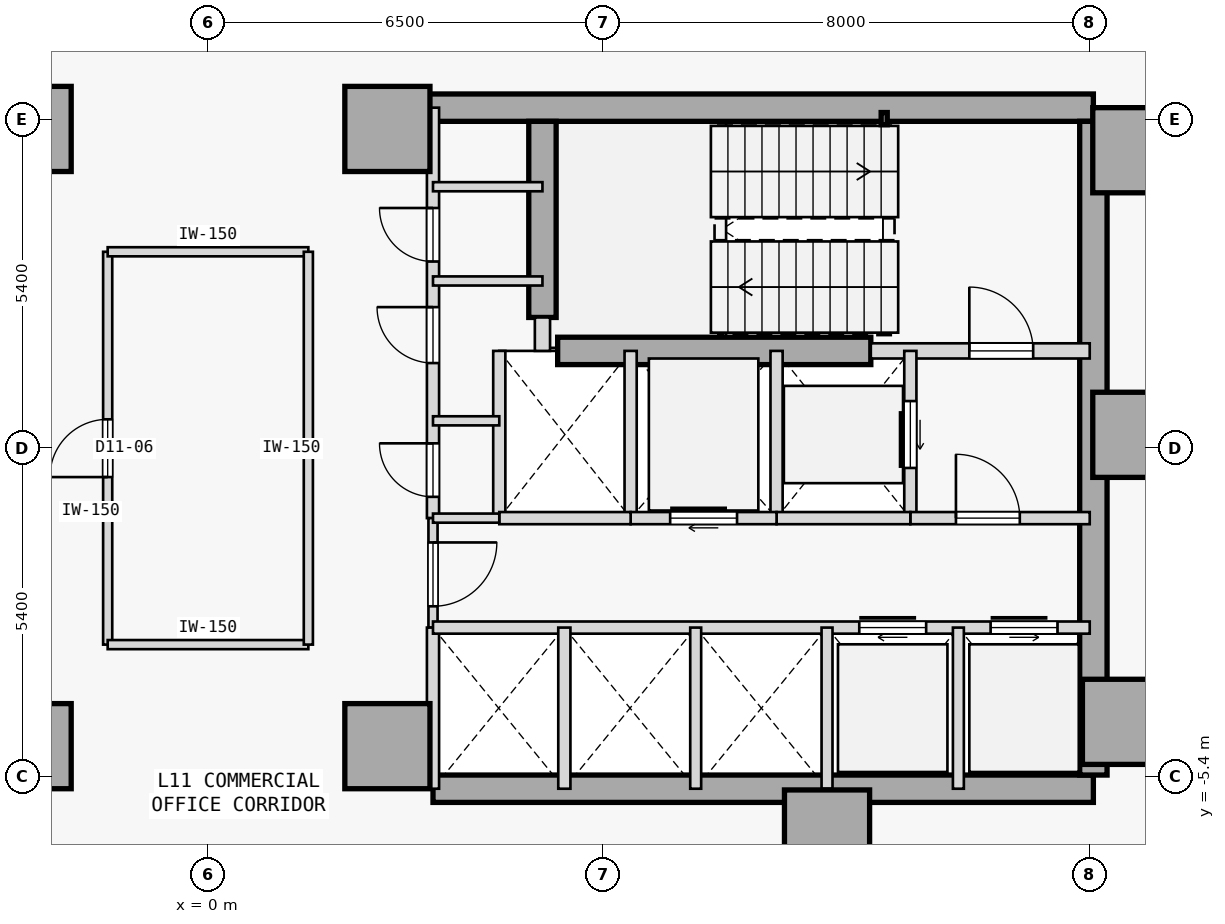
"""IFC4 building model, lengths in metres.
Left out: names, types, materials, properties, quantities, classifications, styles, units other than length and angle.
Written with IfcOpenShell. Run it as: python <this file> out.ifc"""

import sys

from ifc_helpers import new_model, si_unit, direction, frame, frame_2d, origin, origin_2d, place, context, subcontext, project, spatial, rectangle, hollow_rectangle, extrude, element, fill, save


model = new_model("IFC4")
c1 = context("Model", 3, precision=1e-05, world=origin(), true_north=direction((0.0, 1.0)))
c2 = subcontext(c1, "Body", "Model", "MODEL_VIEW")
j1 = project(units=[si_unit("LENGTHUNIT", "METRE"), si_unit("PLANEANGLEUNIT", "RADIAN")], contexts=[c1])
p1 = place(None, origin())
s1 = spatial("IfcSite", under=j1, at=p1, CompositionType="ELEMENT")
p2 = place(p1, origin())
s2 = spatial("IfcBuilding", under=s1, at=p2, CompositionType="ELEMENT")
p3 = place(p2, frame((0.0, 0.0, 48.4)))
s3 = spatial("IfcBuildingStorey", under=s2, at=p3, CompositionType="ELEMENT", Elevation=48.4)
for number, where, z_axis, x_axis in (
    (1, (-2.95, -4.9, 0.0), (0.0, 0.0, 1.0), (1.0, 0.0, 0.0)),
    (2, (-2.95, 5.25, 0.0), (0.0, 0.0, 1.0), (1.0, 0.0, 0.0)),
    (3, (15.25, 4.9, 0.0), (0.0, 0.0, 1.0), (1.0, 0.0, 0.0)),
    (4, (15.25, 0.22, 0.0), (0.0, 0.0, 1.0), (1.0, 0.0, 0.0)),
    (5, (15.08, -4.5, 0.0), (0.0, 0.0, 1.0), (1.0, 0.0, 0.0)),
    (6, (10.18, -6.32, 0.0), (0.0, 0.0, 1.0), (1.0, 0.0, 0.0)),
    (7, (2.95, -4.9, 0.0), (0.0, 0.0, 1.0), (1.0, 0.0, 0.0)),
    (8, (2.95, 5.25, 0.0), (0.0, 0.0, 1.0), (1.0, 0.0, 0.0)),
):
    element("IfcColumn", number, at=place(p3, frame(where, z_axis=z_axis, x_axis=x_axis)), inside=s3, PredefinedType="COLUMN", context=c2, shape_type="SweptSolid", body=[
        extrude(rectangle(XDim=1.4, YDim=1.4, at=origin_2d()), origin(), (0.0, 0.0, 1.0), 3.8),
    ])
p4 = place(p3, frame((3.15, 5.6, 0.0), z_axis=(0.0, 0.0, 1.0), x_axis=(1.0, 0.0, 0.0)))
e9 = element("IfcWall", 9, at=p4, inside=s3, PredefinedType="SHEAR", context=c2, shape_type="SweptSolid", body=[
    extrude(rectangle(XDim=11.41, YDim=0.45, at=frame_2d((5.705, 0.0))), origin(), (0.0, 0.0, 1.0), 3.575),
])
p5 = place(p3, frame((3.7, -5.6, 0.0), z_axis=(0.0, 0.0, 1.0), x_axis=(1.0, 0.0, 0.0)))
e10 = element("IfcWall", 10, at=p5, inside=s3, PredefinedType="SHEAR", context=c2, shape_type="SweptSolid", body=[
    extrude(rectangle(XDim=10.86, YDim=0.45, at=frame_2d((5.43, 0.0))), origin(), (0.0, 0.0, 1.0), 3.575),
])
p6 = place(p3, frame((14.56, -5.375, 0.0), z_axis=(0.0, 0.0, 1.0), x_axis=(0.0, 1.0, 0.0)))
e11 = element("IfcWall", 11, at=p6, inside=s3, PredefinedType="SHEAR", context=c2, shape_type="SweptSolid", body=[
    extrude(rectangle(XDim=10.75, YDim=0.45, at=frame_2d((5.375, 0.0))), origin(), (0.0, 0.0, 1.0), 3.575),
])
p7 = place(p3, frame((5.5, 2.15, 0.0), z_axis=(0.0, 0.0, 1.0), x_axis=(0.0, 1.0, 0.0)))
e12 = element("IfcWall", 12, at=p7, inside=s3, PredefinedType="SHEAR", context=c2, shape_type="SweptSolid", body=[
    extrude(rectangle(XDim=3.225, YDim=0.45, at=frame_2d((1.613, 0.0))), origin(), (0.0, 0.0, 1.0), 3.575),
])
p8 = place(p3, frame((5.75, 1.6, 0.0), z_axis=(0.0, 0.0, 1.0), x_axis=(1.0, 0.0, 0.0)))
e13 = element("IfcWall", 13, at=p8, inside=s3, PredefinedType="SHEAR", context=c2, shape_type="SweptSolid", body=[
    extrude(rectangle(XDim=5.15, YDim=0.45, at=frame_2d((2.575, 0.0))), origin(), (0.0, 0.0, 1.0), 3.575),
])
p9 = place(p3, frame((11.12, 5.42, 0.0), z_axis=(0.0, 0.0, 1.0), x_axis=(1.0, 0.0, 0.0)))
e14 = element("IfcColumn", 14, at=p9, inside=s3, PredefinedType="COLUMN", context=c2, shape_type="SweptSolid", body=[
    extrude(hollow_rectangle(XDim=0.1, YDim=0.2, WallThickness=0.008, at=origin_2d()), origin(), (0.0, 0.0, 1.0), 3.8),
])
p10 = place(p3, frame((10.9, 1.6, 0.0), z_axis=(0.0, 0.0, 1.0), x_axis=(1.0, 0.0, 0.0)))
e15 = element("IfcWall", 15, at=p10, inside=s3, PredefinedType="STANDARD", context=c2, shape_type="SweptSolid", body=[
    extrude(rectangle(XDim=3.6, YDim=0.25, at=frame_2d((1.8, 0.0))), origin(), (0.0, 0.0, 1.0), 3.575),
])
p11 = place(p10, frame((1.62, 0.0, 0.0)))
e16 = element("IfcOpeningElement", 16, at=p11, cuts=e15, PredefinedType="OPENING", context=c2, shape_type="SweptSolid", body=[
    extrude(rectangle(XDim=1.05, YDim=2.15, at=frame_2d((0.525, 1.075))), frame((0.0, 0.135, 0.0), z_axis=(0.0, -1.0, 0.0), x_axis=(1.0, 0.0, 0.0)), (0.0, 0.0, 1.0), 0.27),
])
p12 = place(p3, frame((5.5, 1.6, 0.0), z_axis=(0.0, 0.0, 1.0), x_axis=(0.0, 1.0, 0.0)))
e17 = element("IfcWall", 17, at=p12, inside=s3, PredefinedType="STANDARD", context=c2, shape_type="SweptSolid", body=[
    extrude(rectangle(XDim=0.55, YDim=0.25, at=frame_2d((0.275, 0.0))), origin(), (0.0, 0.0, 1.0), 3.575),
])
p13 = place(p3, frame((3.7, -1.15, 0.0), z_axis=(0.0, 0.0, 1.0), x_axis=(0.0, 1.0, 0.0)))
e18 = element("IfcWall", 18, at=p13, inside=s3, PredefinedType="STANDARD", context=c2, shape_type="SweptSolid", body=[
    extrude(rectangle(XDim=6.75, YDim=0.2, at=frame_2d((3.375, 0.0))), origin(), (0.0, 0.0, 1.0), 3.575),
])
p14 = place(p13, frame((0.35, 0.0, 0.0)))
e19 = element("IfcOpeningElement", 19, at=p14, cuts=e18, PredefinedType="OPENING", context=c2, shape_type="SweptSolid", body=[
    extrude(rectangle(XDim=0.88, YDim=2.15, at=frame_2d((0.44, 1.075))), frame((0.0, 0.11, 0.0), z_axis=(0.0, -1.0, 0.0), x_axis=(1.0, 0.0, 0.0)), (0.0, 0.0, 1.0), 0.22),
])
p15 = place(p13, frame((2.55, 0.0, 0.0)))
e20 = element("IfcOpeningElement", 20, at=p15, cuts=e18, PredefinedType="OPENING", context=c2, shape_type="SweptSolid", body=[
    extrude(rectangle(XDim=0.92, YDim=2.15, at=frame_2d((0.46, 1.075))), frame((0.0, 0.11, 0.0), z_axis=(0.0, -1.0, 0.0), x_axis=(1.0, 0.0, 0.0)), (0.0, 0.0, 1.0), 0.22),
])
p16 = place(p13, frame((4.22, 0.0, 0.0)))
e21 = element("IfcOpeningElement", 21, at=p16, cuts=e18, PredefinedType="OPENING", context=c2, shape_type="SweptSolid", body=[
    extrude(rectangle(XDim=0.88, YDim=2.15, at=frame_2d((0.44, 1.075))), frame((0.0, 0.11, 0.0), z_axis=(0.0, -1.0, 0.0), x_axis=(1.0, 0.0, 0.0)), (0.0, 0.0, 1.0), 0.22),
])
p17 = place(p3, frame((3.7, -2.95, 0.0), z_axis=(0.0, 0.0, 1.0), x_axis=(0.0, 1.0, 0.0)))
e22 = element("IfcWall", 22, at=p17, inside=s3, PredefinedType="PARTITIONING", context=c2, shape_type="SweptSolid", body=[
    extrude(rectangle(XDim=1.8, YDim=0.15, at=frame_2d((0.9, 0.0))), origin(), (0.0, 0.0, 1.0), 3.575),
])
p18 = place(p17, frame((0.35, 0.0, 0.0)))
e23 = element("IfcOpeningElement", 23, at=p18, cuts=e22, PredefinedType="OPENING", context=c2, shape_type="SweptSolid", body=[
    extrude(rectangle(XDim=1.05, YDim=2.18, at=frame_2d((0.525, 1.09))), frame((0.0, 0.085, 0.0), z_axis=(0.0, -1.0, 0.0), x_axis=(1.0, 0.0, 0.0)), (0.0, 0.0, 1.0), 0.17),
])
p19 = place(p3, frame((3.7, -5.6, 0.0), z_axis=(0.0, 0.0, 1.0), x_axis=(0.0, 1.0, 0.0)))
e24 = element("IfcWall", 24, at=p19, inside=s3, PredefinedType="STANDARD", context=c2, shape_type="SweptSolid", body=[
    extrude(rectangle(XDim=2.65, YDim=0.2, at=frame_2d((1.325, 0.0))), origin(), (0.0, 0.0, 1.0), 3.575),
])
p20 = place(p3, frame((11.55, -1.15, 0.0), z_axis=(0.0, 0.0, 1.0), x_axis=(0.0, 1.0, 0.0)))
e25 = element("IfcWall", 25, at=p20, inside=s3, PredefinedType="STANDARD", context=c2, shape_type="SweptSolid", body=[
    extrude(rectangle(XDim=2.75, YDim=0.2, at=frame_2d((1.375, 0.0))), origin(), (0.0, 0.0, 1.0), 3.575),
])
p21 = place(p20, frame((0.825, 0.0, 0.0)))
e26 = element("IfcOpeningElement", 26, at=p21, cuts=e25, PredefinedType="OPENING", context=c2, shape_type="SweptSolid", body=[
    extrude(rectangle(XDim=1.1, YDim=2.15, at=frame_2d((0.55, 1.075))), frame((0.0, 0.11, 0.0), z_axis=(0.0, -1.0, 0.0), x_axis=(1.0, 0.0, 0.0)), (0.0, 0.0, 1.0), 0.22),
])
p22 = place(p3, frame((9.35, -1.15, 0.0), z_axis=(0.0, 0.0, 1.0), x_axis=(0.0, 1.0, 0.0)))
e27 = element("IfcWall", 27, at=p22, inside=s3, PredefinedType="STANDARD", context=c2, shape_type="SweptSolid", body=[
    extrude(rectangle(XDim=2.75, YDim=0.2, at=frame_2d((1.375, 0.0))), origin(), (0.0, 0.0, 1.0), 3.575),
])
p23 = place(p3, frame((11.55, -1.15, 0.0), z_axis=(0.0, 0.0, 1.0), x_axis=(1.0, 0.0, 0.0)))
e28 = element("IfcWall", 28, at=p23, inside=s3, PredefinedType="STANDARD", context=c2, shape_type="SweptSolid", body=[
    extrude(rectangle(XDim=2.95, YDim=0.2, at=frame_2d((1.475, 0.0))), origin(), (0.0, 0.0, 1.0), 3.575),
])
p24 = place(p23, frame((0.75, 0.0, 0.0)))
e29 = element("IfcOpeningElement", 29, at=p24, cuts=e28, PredefinedType="OPENING", context=c2, shape_type="SweptSolid", body=[
    extrude(rectangle(XDim=1.05, YDim=2.18, at=frame_2d((0.525, 1.09))), frame((0.0, 0.11, 0.0), z_axis=(0.0, -1.0, 0.0), x_axis=(1.0, 0.0, 0.0)), (0.0, 0.0, 1.0), 0.22),
])
p25 = place(p3, frame((9.35, -1.15, 0.0), z_axis=(0.0, 0.0, 1.0), x_axis=(1.0, 0.0, 0.0)))
e30 = element("IfcWall", 30, at=p25, inside=s3, PredefinedType="STANDARD", context=c2, shape_type="SweptSolid", body=[
    extrude(rectangle(XDim=2.2, YDim=0.2, at=frame_2d((1.1, 0.0))), origin(), (0.0, 0.0, 1.0), 3.575),
])
p26 = place(p3, frame((6.95, -1.15, 0.0), z_axis=(0.0, 0.0, 1.0), x_axis=(0.0, 1.0, 0.0)))
e31 = element("IfcWall", 31, at=p26, inside=s3, PredefinedType="STANDARD", context=c2, shape_type="SweptSolid", body=[
    extrude(rectangle(XDim=2.75, YDim=0.2, at=frame_2d((1.375, 0.0))), origin(), (0.0, 0.0, 1.0), 3.575),
])
p27 = place(p3, frame((6.95, -1.15, 0.0), z_axis=(0.0, 0.0, 1.0), x_axis=(1.0, 0.0, 0.0)))
e32 = element("IfcWall", 32, at=p27, inside=s3, PredefinedType="STANDARD", context=c2, shape_type="SweptSolid", body=[
    extrude(rectangle(XDim=2.4, YDim=0.2, at=frame_2d((1.2, 0.0))), origin(), (0.0, 0.0, 1.0), 3.575),
])
p28 = place(p27, frame((0.65, 0.0, 0.0)))
e33 = element("IfcOpeningElement", 33, at=p28, cuts=e32, PredefinedType="OPENING", context=c2, shape_type="SweptSolid", body=[
    extrude(rectangle(XDim=1.1, YDim=2.15, at=frame_2d((0.55, 1.075))), frame((0.0, 0.11, 0.0), z_axis=(0.0, -1.0, 0.0), x_axis=(1.0, 0.0, 0.0)), (0.0, 0.0, 1.0), 0.22),
])
p29 = place(p3, frame((4.79, -1.15, 0.0), z_axis=(0.0, 0.0, 1.0), x_axis=(0.0, 1.0, 0.0)))
e34 = element("IfcWall", 34, at=p29, inside=s3, PredefinedType="STANDARD", context=c2, shape_type="SweptSolid", body=[
    extrude(rectangle(XDim=2.75, YDim=0.2, at=frame_2d((1.375, 0.0))), origin(), (0.0, 0.0, 1.0), 3.575),
])
p30 = place(p3, frame((4.79, -1.15, 0.0), z_axis=(0.0, 0.0, 1.0), x_axis=(1.0, 0.0, 0.0)))
e35 = element("IfcWall", 35, at=p30, inside=s3, PredefinedType="STANDARD", context=c2, shape_type="SweptSolid", body=[
    extrude(rectangle(XDim=2.16, YDim=0.2, at=frame_2d((1.08, 0.0))), origin(), (0.0, 0.0, 1.0), 3.575),
])
p31 = place(p3, frame((3.7, -1.15, 0.0), z_axis=(0.0, 0.0, 1.0), x_axis=(1.0, 0.0, 0.0)))
e36 = element("IfcWall", 36, at=p31, inside=s3, PredefinedType="PARTITIONING", context=c2, shape_type="SweptSolid", body=[
    extrude(rectangle(XDim=1.09, YDim=0.15, at=frame_2d((0.545, 0.0))), origin(), (0.0, 0.0, 1.0), 3.575),
])
p32 = place(p3, frame((3.7, -2.95, 0.0), z_axis=(0.0, 0.0, 1.0), x_axis=(1.0, 0.0, 0.0)))
e37 = element("IfcWall", 37, at=p32, inside=s3, PredefinedType="STANDARD", context=c2, shape_type="SweptSolid", body=[
    extrude(rectangle(XDim=10.8, YDim=0.2, at=frame_2d((5.4, 0.0))), origin(), (0.0, 0.0, 1.0), 3.575),
])
p33 = place(p32, frame((7.01, 0.0, 0.0)))
e38 = element("IfcOpeningElement", 38, at=p33, cuts=e37, PredefinedType="OPENING", context=c2, shape_type="SweptSolid", body=[
    extrude(rectangle(XDim=1.1, YDim=2.15, at=frame_2d((0.55, 1.075))), frame((0.0, 0.11, 0.0), z_axis=(0.0, -1.0, 0.0), x_axis=(1.0, 0.0, 0.0)), (0.0, 0.0, 1.0), 0.22),
])
p34 = place(p32, frame((9.17, 0.0, 0.0)))
e39 = element("IfcOpeningElement", 39, at=p34, cuts=e37, PredefinedType="OPENING", context=c2, shape_type="SweptSolid", body=[
    extrude(rectangle(XDim=1.1, YDim=2.15, at=frame_2d((0.55, 1.075))), frame((0.0, 0.11, 0.0), z_axis=(0.0, -1.0, 0.0), x_axis=(1.0, 0.0, 0.0)), (0.0, 0.0, 1.0), 0.22),
])
p35 = place(p3, frame((5.86, -5.6, 0.0), z_axis=(0.0, 0.0, 1.0), x_axis=(0.0, 1.0, 0.0)))
e40 = element("IfcWall", 40, at=p35, inside=s3, PredefinedType="STANDARD", context=c2, shape_type="SweptSolid", body=[
    extrude(rectangle(XDim=2.65, YDim=0.2, at=frame_2d((1.325, 0.0))), origin(), (0.0, 0.0, 1.0), 3.575),
])
for number, where, z_axis, x_axis in (
    (41, (12.34, -5.6, 0.0), (0.0, 0.0, 1.0), (0.0, 1.0, 0.0)),
    (42, (10.18, -5.6, 0.0), (0.0, 0.0, 1.0), (0.0, 1.0, 0.0)),
    (43, (8.02, -5.6, 0.0), (0.0, 0.0, 1.0), (0.0, 1.0, 0.0)),
):
    element("IfcWall", number, at=place(p3, frame(where, z_axis=z_axis, x_axis=x_axis)), inside=s3, PredefinedType="STANDARD", context=c2, shape_type="SweptSolid", body=[
        extrude(rectangle(XDim=2.65, YDim=0.18, at=frame_2d((1.325, 0.0))), origin(), (0.0, 0.0, 1.0), 3.575),
    ])
p36 = place(p3, frame((3.7, 4.3, 0.0), z_axis=(0.0, 0.0, 1.0), x_axis=(1.0, 0.0, 0.0)))
e44 = element("IfcWall", 44, at=p36, inside=s3, PredefinedType="PARTITIONING", context=c2, shape_type="SweptSolid", body=[
    extrude(rectangle(XDim=1.8, YDim=0.15, at=frame_2d((0.9, 0.0))), origin(), (0.0, 0.0, 1.0), 3.575),
])
p37 = place(p3, frame((3.7, 0.45, 0.0), z_axis=(0.0, 0.0, 1.0), x_axis=(1.0, 0.0, 0.0)))
e45 = element("IfcWall", 45, at=p37, inside=s3, PredefinedType="PARTITIONING", context=c2, shape_type="SweptSolid", body=[
    extrude(rectangle(XDim=1.09, YDim=0.15, at=frame_2d((0.545, 0.0))), origin(), (0.0, 0.0, 1.0), 3.575),
])
p38 = place(p3, frame((3.7, 2.75, 0.0), z_axis=(0.0, 0.0, 1.0), x_axis=(1.0, 0.0, 0.0)))
e46 = element("IfcWall", 46, at=p38, inside=s3, PredefinedType="PARTITIONING", context=c2, shape_type="SweptSolid", body=[
    extrude(rectangle(XDim=1.8, YDim=0.15, at=frame_2d((0.9, 0.0))), origin(), (0.0, 0.0, 1.0), 3.575),
])
p39 = place(p3, frame((-1.65, -3.23, 0.0), z_axis=(0.0, 0.0, 1.0), x_axis=(0.0, 1.0, 0.0)))
e47 = element("IfcWall", 47, at=p39, inside=s3, PredefinedType="PARTITIONING", context=c2, shape_type="SweptSolid", body=[
    extrude(rectangle(XDim=6.46, YDim=0.15, at=frame_2d((3.23, 0.0))), origin(), (0.0, 0.0, 1.0), 3.575),
])
p40 = place(p39, frame((2.755, 0.0, 0.0)))
e48 = element("IfcOpeningElement", 48, at=p40, cuts=e47, PredefinedType="OPENING", context=c2, shape_type="SweptSolid", body=[
    extrude(rectangle(XDim=0.95, YDim=2.15, at=frame_2d((0.475, 1.075))), frame((0.0, 0.085, 0.0), z_axis=(0.0, -1.0, 0.0), x_axis=(1.0, 0.0, 0.0)), (0.0, 0.0, 1.0), 0.17),
])
for number, where, z_axis, x_axis in (
    (49, (-1.65, -3.23, 0.0), (0.0, 0.0, 1.0), (1.0, 0.0, 0.0)),
    (50, (-1.65, 3.23, 0.0), (0.0, 0.0, 1.0), (1.0, 0.0, 0.0)),
):
    element("IfcWall", number, at=place(p3, frame(where, z_axis=z_axis, x_axis=x_axis)), inside=s3, PredefinedType="PARTITIONING", context=c2, shape_type="SweptSolid", body=[
        extrude(rectangle(XDim=3.3, YDim=0.15, at=frame_2d((1.65, 0.0))), origin(), (0.0, 0.0, 1.0), 3.575),
    ])
p41 = place(p3, frame((1.65, -3.23, 0.0), z_axis=(0.0, 0.0, 1.0), x_axis=(0.0, 1.0, 0.0)))
e51 = element("IfcWall", 51, at=p41, inside=s3, PredefinedType="PARTITIONING", context=c2, shape_type="SweptSolid", body=[
    extrude(rectangle(XDim=6.46, YDim=0.15, at=frame_2d((3.23, 0.0))), origin(), (0.0, 0.0, 1.0), 3.575),
])
p42 = place(p11, origin())
e52 = element("IfcDoor", 52, at=p42, inside=s3, OperationType="SINGLE_SWING_LEFT", PredefinedType="DOOR", context=c2, shape_type="SweptSolid", body=[
    extrude(rectangle(XDim=1.05, YDim=2.15, at=frame_2d((0.525, 1.075))), frame((0.0, 0.025, 0.0), z_axis=(0.0, -1.0, 0.0), x_axis=(1.0, 0.0, 0.0)), (0.0, 0.0, 1.0), 0.05),
])
fill(e16, e52)
p43 = place(p24, origin())
e53 = element("IfcDoor", 53, at=p43, inside=s3, OperationType="SINGLE_SWING_LEFT", PredefinedType="DOOR", context=c2, shape_type="SweptSolid", body=[
    extrude(rectangle(XDim=1.05, YDim=2.18, at=frame_2d((0.525, 1.09))), frame((0.0, 0.025, 0.0), z_axis=(0.0, -1.0, 0.0), x_axis=(1.0, 0.0, 0.0)), (0.0, 0.0, 1.0), 0.05),
])
fill(e29, e53)
p44 = place(p18, frame((1.05, 0.0, 0.0), z_axis=(0.0, 0.0, 1.0), x_axis=(-1.0, 0.0, 0.0)))
e54 = element("IfcDoor", 54, at=p44, inside=s3, OperationType="SINGLE_SWING_RIGHT", PredefinedType="DOOR", context=c2, shape_type="SweptSolid", body=[
    extrude(rectangle(XDim=1.05, YDim=2.18, at=frame_2d((0.525, 1.09))), frame((0.0, 0.025, 0.0), z_axis=(0.0, -1.0, 0.0), x_axis=(1.0, 0.0, 0.0)), (0.0, 0.0, 1.0), 0.05),
])
fill(e23, e54)
p45 = place(p21, origin())
e55 = element("IfcDoor", 55, at=p45, inside=s3, OperationType="SLIDING_TO_RIGHT", PredefinedType="DOOR", context=c2, shape_type="SweptSolid", body=[
    extrude(rectangle(XDim=1.1, YDim=2.15, at=frame_2d((0.55, 1.075))), frame((0.0, 0.025, 0.0), z_axis=(0.0, -1.0, 0.0), x_axis=(1.0, 0.0, 0.0)), (0.0, 0.0, 1.0), 0.05),
])
fill(e26, e55)
p46 = place(p28, origin())
e56 = element("IfcDoor", 56, at=p46, inside=s3, OperationType="SLIDING_TO_RIGHT", PredefinedType="DOOR", context=c2, shape_type="SweptSolid", body=[
    extrude(rectangle(XDim=1.1, YDim=2.15, at=frame_2d((0.55, 1.075))), frame((0.0, 0.025, 0.0), z_axis=(0.0, -1.0, 0.0), x_axis=(1.0, 0.0, 0.0)), (0.0, 0.0, 1.0), 0.05),
])
fill(e33, e56)
p47 = place(p33, origin())
e57 = element("IfcDoor", 57, at=p47, inside=s3, OperationType="SLIDING_TO_RIGHT", PredefinedType="DOOR", context=c2, shape_type="SweptSolid", body=[
    extrude(rectangle(XDim=1.1, YDim=2.15, at=frame_2d((0.55, 1.075))), frame((0.0, 0.025, 0.0), z_axis=(0.0, -1.0, 0.0), x_axis=(1.0, 0.0, 0.0)), (0.0, 0.0, 1.0), 0.05),
])
fill(e38, e57)
p48 = place(p34, origin())
e58 = element("IfcDoor", 58, at=p48, inside=s3, OperationType="SLIDING_TO_LEFT", PredefinedType="DOOR", context=c2, shape_type="SweptSolid", body=[
    extrude(rectangle(XDim=1.1, YDim=2.15, at=frame_2d((0.55, 1.075))), frame((0.0, 0.025, 0.0), z_axis=(0.0, -1.0, 0.0), x_axis=(1.0, 0.0, 0.0)), (0.0, 0.0, 1.0), 0.05),
])
fill(e39, e58)
p49 = place(p14, origin())
e59 = element("IfcDoor", 59, at=p49, inside=s3, OperationType="SINGLE_SWING_RIGHT", PredefinedType="DOOR", context=c2, shape_type="SweptSolid", body=[
    extrude(rectangle(XDim=0.88, YDim=2.15, at=frame_2d((0.44, 1.075))), frame((0.0, 0.025, 0.0), z_axis=(0.0, -1.0, 0.0), x_axis=(1.0, 0.0, 0.0)), (0.0, 0.0, 1.0), 0.05),
])
fill(e19, e59)
p50 = place(p15, origin())
e60 = element("IfcDoor", 60, at=p50, inside=s3, OperationType="SINGLE_SWING_RIGHT", PredefinedType="DOOR", context=c2, shape_type="SweptSolid", body=[
    extrude(rectangle(XDim=0.92, YDim=2.15, at=frame_2d((0.46, 1.075))), frame((0.0, 0.025, 0.0), z_axis=(0.0, -1.0, 0.0), x_axis=(1.0, 0.0, 0.0)), (0.0, 0.0, 1.0), 0.05),
])
fill(e20, e60)
p51 = place(p16, origin())
e61 = element("IfcDoor", 61, at=p51, inside=s3, OperationType="SINGLE_SWING_RIGHT", PredefinedType="DOOR", context=c2, shape_type="SweptSolid", body=[
    extrude(rectangle(XDim=0.88, YDim=2.15, at=frame_2d((0.44, 1.075))), frame((0.0, 0.025, 0.0), z_axis=(0.0, -1.0, 0.0), x_axis=(1.0, 0.0, 0.0)), (0.0, 0.0, 1.0), 0.05),
])
fill(e21, e61)
p52 = place(p40, origin())
e62 = element("IfcDoor", 62, at=p52, inside=s3, OperationType="SINGLE_SWING_LEFT", PredefinedType="DOOR", context=c2, shape_type="SweptSolid", body=[
    extrude(rectangle(XDim=0.95, YDim=2.15, at=frame_2d((0.475, 1.075))), frame((0.0, 0.025, 0.0), z_axis=(0.0, -1.0, 0.0), x_axis=(1.0, 0.0, 0.0)), (0.0, 0.0, 1.0), 0.05),
])
fill(e48, e62)
save(model, sys.argv[1])
